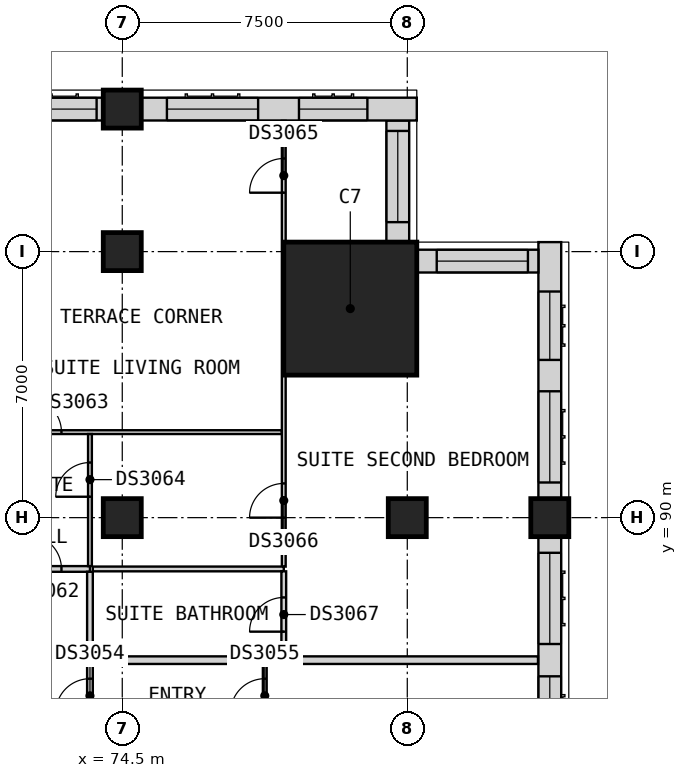
"""IFC4 building model, lengths in metres.
Left out: names, types, materials, properties, quantities, classifications, styles, units other than length and angle.
Written with IfcOpenShell. Run it as: python <this file> out.ifc"""

import sys

from ifc_helpers import new_model, si_unit, direction, frame, frame_2d, origin, origin_2d, place, context, subcontext, project, spatial, rectangle, extrude, element, fill, save


model = new_model("IFC4")
c1 = context("Model", 3, precision=1e-05, world=origin(), true_north=direction((0.0, 1.0)))
c2 = subcontext(c1, "Body", "Model", "MODEL_VIEW")
j1 = project(units=[si_unit("LENGTHUNIT", "METRE"), si_unit("PLANEANGLEUNIT", "RADIAN")], contexts=[c1])
p1 = place(None, origin())
s1 = spatial("IfcSite", under=j1, at=p1, CompositionType="ELEMENT")
p2 = place(p1, origin())
s2 = spatial("IfcBuilding", under=s1, at=p2, CompositionType="ELEMENT")
p3 = place(p2, frame((0.0, 0.0, 137.4)))
s3 = spatial("IfcBuildingStorey", under=s2, at=p3, CompositionType="ELEMENT", Elevation=137.4)
for number, where, z_axis, x_axis in (
    (1, (85.75, 90.0, 0.0), (0.0, 0.0, 1.0), (1.0, 0.0, 0.0)),
    (2, (74.5, 100.75, 0.0), (0.0, 0.0, 1.0), (1.0, 0.0, 0.0)),
    (3, (74.5, 90.0, 0.0), (0.0, 0.0, 1.0), (1.0, 0.0, 0.0)),
    (4, (74.5, 97.0, 0.0), (0.0, 0.0, 1.0), (1.0, 0.0, 0.0)),
    (5, (82.0, 90.0, 0.0), (0.0, 0.0, 1.0), (1.0, 0.0, 0.0)),
):
    element("IfcColumn", number, at=place(p3, frame(where, z_axis=z_axis, x_axis=x_axis)), inside=s3, PredefinedType="COLUMN", context=c2, shape_type="SweptSolid", body=[
        extrude(rectangle(XDim=1.0, YDim=1.0, at=origin_2d()), origin(), (0.0, 0.0, 1.0), 3.6),
    ])
p4 = place(p3, frame((80.5, 95.5, 0.0), z_axis=(0.0, 0.0, 1.0), x_axis=(1.0, 0.0, 0.0)))
e6 = element("IfcColumn", 6, at=p4, inside=s3, PredefinedType="COLUMN", context=c2, shape_type="SweptSolid", body=[
    extrude(rectangle(XDim=3.5, YDim=3.5, at=origin_2d()), origin(), (0.0, 0.0, 1.0), 3.6),
])
p5 = place(p3, frame((85.75, 83.0, 0.0), z_axis=(0.0, 0.0, 1.0), x_axis=(0.0, 1.0, 0.0)))
e7 = element("IfcWall", 7, at=p5, inside=s3, PredefinedType="SOLIDWALL", context=c2, shape_type="SweptSolid", body=[
    extrude(rectangle(XDim=6.5, YDim=0.6, at=frame_2d((3.25, 0.0))), origin(), (0.0, 0.0, 1.0), 2.85),
])
p6 = place(p5, frame((0.425, 0.0, 0.8)))
e8 = element("IfcOpeningElement", 8, at=p6, cuts=e7, PredefinedType="OPENING", context=c2, shape_type="SweptSolid", body=[
    extrude(rectangle(XDim=2.4, YDim=1.8, at=frame_2d((1.2, 0.9))), frame((0.0, 0.31, 0.0), z_axis=(0.0, -1.0, 0.0), x_axis=(1.0, 0.0, 0.0)), (0.0, 0.0, 1.0), 0.62),
])
p7 = place(p5, frame((3.675, 0.0, 0.8)))
e9 = element("IfcOpeningElement", 9, at=p7, cuts=e7, PredefinedType="OPENING", context=c2, shape_type="SweptSolid", body=[
    extrude(rectangle(XDim=2.4, YDim=1.8, at=frame_2d((1.2, 0.9))), frame((0.0, 0.31, 0.0), z_axis=(0.0, -1.0, 0.0), x_axis=(1.0, 0.0, 0.0)), (0.0, 0.0, 1.0), 0.62),
])
p8 = place(p3, frame((85.75, 90.5, 0.0), z_axis=(0.0, 0.0, 1.0), x_axis=(0.0, 1.0, 0.0)))
e10 = element("IfcWall", 10, at=p8, inside=s3, PredefinedType="SOLIDWALL", context=c2, shape_type="SweptSolid", body=[
    extrude(rectangle(XDim=6.75, YDim=0.6, at=frame_2d((3.375, 0.0))), origin(), (0.0, 0.0, 1.0), 2.85),
])
p9 = place(p8, frame((0.425, 0.0, 0.8)))
e11 = element("IfcOpeningElement", 11, at=p9, cuts=e10, PredefinedType="OPENING", context=c2, shape_type="SweptSolid", body=[
    extrude(rectangle(XDim=2.4, YDim=1.8, at=frame_2d((1.2, 0.9))), frame((0.0, 0.31, 0.0), z_axis=(0.0, -1.0, 0.0), x_axis=(1.0, 0.0, 0.0)), (0.0, 0.0, 1.0), 0.62),
])
p10 = place(p8, frame((3.65, 0.0, 0.8)))
e12 = element("IfcOpeningElement", 12, at=p10, cuts=e10, PredefinedType="OPENING", context=c2, shape_type="SweptSolid", body=[
    extrude(rectangle(XDim=1.8, YDim=1.8, at=frame_2d((0.9, 0.9))), frame((0.0, 0.31, 0.0), z_axis=(0.0, -1.0, 0.0), x_axis=(1.0, 0.0, 0.0)), (0.0, 0.0, 1.0), 0.62),
])
p11 = place(p3, frame((85.45, 96.75, 0.0), z_axis=(0.0, 0.0, 1.0), x_axis=(-1.0, 0.0, 0.0)))
e13 = element("IfcWall", 13, at=p11, inside=s3, PredefinedType="SOLIDWALL", context=c2, shape_type="SweptSolid", body=[
    extrude(rectangle(XDim=3.2, YDim=0.6, at=frame_2d((1.6, 0.0))), origin(), (0.0, 0.0, 1.0), 3.35),
])
p12 = place(p11, frame((0.275, 0.0, 0.8)))
e14 = element("IfcOpeningElement", 14, at=p12, cuts=e13, PredefinedType="OPENING", context=c2, shape_type="SweptSolid", body=[
    extrude(rectangle(XDim=2.4, YDim=1.8, at=frame_2d((1.2, 0.9))), frame((0.0, 0.31, 0.0), z_axis=(0.0, -1.0, 0.0), x_axis=(1.0, 0.0, 0.0)), (0.0, 0.0, 1.0), 0.62),
])
p13 = place(p3, frame((81.75, 97.25, 0.0), z_axis=(0.0, 0.0, 1.0), x_axis=(0.0, 1.0, 0.0)))
e15 = element("IfcWall", 15, at=p13, inside=s3, PredefinedType="SOLIDWALL", context=c2, shape_type="SweptSolid", body=[
    extrude(rectangle(XDim=3.2, YDim=0.6, at=frame_2d((1.6, 0.0))), origin(), (0.0, 0.0, 1.0), 3.35),
])
p14 = place(p13, frame((0.525, 0.0, 0.8)))
e16 = element("IfcOpeningElement", 16, at=p14, cuts=e15, PredefinedType="OPENING", context=c2, shape_type="SweptSolid", body=[
    extrude(rectangle(XDim=2.4, YDim=1.8, at=frame_2d((1.2, 0.9))), frame((0.0, 0.31, 0.0), z_axis=(0.0, -1.0, 0.0), x_axis=(1.0, 0.0, 0.0)), (0.0, 0.0, 1.0), 0.62),
])
p15 = place(p3, frame((82.25, 100.75, 0.0), z_axis=(0.0, 0.0, 1.0), x_axis=(-1.0, 0.0, 0.0)))
e17 = element("IfcWall", 17, at=p15, inside=s3, PredefinedType="SOLIDWALL", context=c2, shape_type="SweptSolid", body=[
    extrude(rectangle(XDim=7.25, YDim=0.6, at=frame_2d((3.625, 0.0))), origin(), (0.0, 0.0, 1.0), 2.85),
])
p16 = place(p15, frame((4.175, 0.0, 0.8)))
e18 = element("IfcOpeningElement", 18, at=p16, cuts=e17, PredefinedType="OPENING", context=c2, shape_type="SweptSolid", body=[
    extrude(rectangle(XDim=2.4, YDim=1.8, at=frame_2d((1.2, 0.9))), frame((0.0, 0.31, 0.0), z_axis=(0.0, -1.0, 0.0), x_axis=(1.0, 0.0, 0.0)), (0.0, 0.0, 1.0), 0.62),
])
p17 = place(p15, frame((1.3, 0.0, 0.8)))
e19 = element("IfcOpeningElement", 19, at=p17, cuts=e17, PredefinedType="OPENING", context=c2, shape_type="SweptSolid", body=[
    extrude(rectangle(XDim=1.8, YDim=1.8, at=frame_2d((0.9, 0.9))), frame((0.0, 0.31, 0.0), z_axis=(0.0, -1.0, 0.0), x_axis=(1.0, 0.0, 0.0)), (0.0, 0.0, 1.0), 0.62),
])
p18 = place(p3, frame((74.0, 100.75, 0.0), z_axis=(0.0, 0.0, 1.0), x_axis=(-1.0, 0.0, 0.0)))
e20 = element("IfcWall", 20, at=p18, inside=s3, PredefinedType="SOLIDWALL", context=c2, shape_type="SweptSolid", body=[
    extrude(rectangle(XDim=6.0, YDim=0.6, at=frame_2d((3.0, 0.0))), origin(), (0.0, 0.0, 1.0), 2.85),
])
p19 = place(p18, frame((3.175, 0.0, 0.8)))
e21 = element("IfcOpeningElement", 21, at=p19, cuts=e20, PredefinedType="OPENING", context=c2, shape_type="SweptSolid", body=[
    extrude(rectangle(XDim=2.4, YDim=1.8, at=frame_2d((1.2, 0.9))), frame((0.0, 0.31, 0.0), z_axis=(0.0, -1.0, 0.0), x_axis=(1.0, 0.0, 0.0)), (0.0, 0.0, 1.0), 0.62),
])
p20 = place(p18, frame((0.175, 0.0, 0.8)))
e22 = element("IfcOpeningElement", 22, at=p20, cuts=e20, PredefinedType="OPENING", context=c2, shape_type="SweptSolid", body=[
    extrude(rectangle(XDim=2.4, YDim=1.8, at=frame_2d((1.2, 0.9))), frame((0.0, 0.31, 0.0), z_axis=(0.0, -1.0, 0.0), x_axis=(1.0, 0.0, 0.0)), (0.0, 0.0, 1.0), 0.62),
])
p21 = place(p3, frame((73.725, 86.25, 0.0), z_axis=(0.0, 0.0, 1.0), x_axis=(1.0, 0.0, 0.0)))
e23 = element("IfcWall", 23, at=p21, inside=s3, PredefinedType="PARTITIONING", context=c2, shape_type="SweptSolid", body=[
    extrude(rectangle(XDim=11.715, YDim=0.2, at=frame_2d((5.857, 0.0))), origin(), (0.0, 0.0, 1.0), 3.35),
])
p22 = place(p3, frame((33.75, 88.65, 0.0), z_axis=(0.0, 0.0, 1.0), x_axis=(1.0, 0.0, 0.0)))
e24 = element("IfcWall", 24, at=p22, inside=s3, PredefinedType="PARTITIONING", context=c2, shape_type="SweptSolid", body=[
    extrude(rectangle(XDim=39.9, YDim=0.15, at=frame_2d((19.95, 0.0))), origin(), (0.0, 0.0, 1.0), 3.35),
])
p23 = place(p22, frame((5.175, 0.0, 0.0)))
e25 = element("IfcOpeningElement", 25, at=p23, cuts=e24, PredefinedType="OPENING", context=c2, shape_type="SweptSolid", body=[
    extrude(rectangle(XDim=0.9, YDim=2.1, at=frame_2d((0.45, 1.05))), frame((0.0, 0.085, 0.0), z_axis=(0.0, -1.0, 0.0), x_axis=(1.0, 0.0, 0.0)), (0.0, 0.0, 1.0), 0.17),
])
p24 = place(p22, frame((13.05, 0.0, 0.0)))
e26 = element("IfcOpeningElement", 26, at=p24, cuts=e24, PredefinedType="OPENING", context=c2, shape_type="SweptSolid", body=[
    extrude(rectangle(XDim=0.9, YDim=2.1, at=frame_2d((0.45, 1.05))), frame((0.0, 0.085, 0.0), z_axis=(0.0, -1.0, 0.0), x_axis=(1.0, 0.0, 0.0)), (0.0, 0.0, 1.0), 0.17),
])
p25 = place(p22, frame((28.05, 0.0, 0.0)))
e27 = element("IfcOpeningElement", 27, at=p25, cuts=e24, PredefinedType="OPENING", context=c2, shape_type="SweptSolid", body=[
    extrude(rectangle(XDim=0.9, YDim=2.1, at=frame_2d((0.45, 1.05))), frame((0.0, 0.085, 0.0), z_axis=(0.0, -1.0, 0.0), x_axis=(1.0, 0.0, 0.0)), (0.0, 0.0, 1.0), 0.17),
])
p26 = place(p22, frame((32.262, 0.0, 0.0)))
e28 = element("IfcOpeningElement", 28, at=p26, cuts=e24, PredefinedType="OPENING", context=c2, shape_type="SweptSolid", body=[
    extrude(rectangle(XDim=0.9, YDim=2.1, at=frame_2d((0.45, 1.05))), frame((0.0, 0.085, 0.0), z_axis=(0.0, -1.0, 0.0), x_axis=(1.0, 0.0, 0.0)), (0.0, 0.0, 1.0), 0.17),
])
p27 = place(p22, frame((36.113, 0.0, 0.0)))
e29 = element("IfcOpeningElement", 29, at=p27, cuts=e24, PredefinedType="OPENING", context=c2, shape_type="SweptSolid", body=[
    extrude(rectangle(XDim=0.9, YDim=2.1, at=frame_2d((0.45, 1.05))), frame((0.0, 0.085, 0.0), z_axis=(0.0, -1.0, 0.0), x_axis=(1.0, 0.0, 0.0)), (0.0, 0.0, 1.0), 0.17),
])
p28 = place(p22, frame((38.25, 0.0, 0.0)))
e30 = element("IfcOpeningElement", 30, at=p28, cuts=e24, PredefinedType="OPENING", context=c2, shape_type="SweptSolid", body=[
    extrude(rectangle(XDim=0.9, YDim=2.1, at=frame_2d((0.45, 1.05))), frame((0.0, 0.085, 0.0), z_axis=(0.0, -1.0, 0.0), x_axis=(1.0, 0.0, 0.0)), (0.0, 0.0, 1.0), 0.17),
])
p29 = place(p3, frame((73.65, 50.175, 0.0), z_axis=(0.0, 0.0, 1.0), x_axis=(0.0, 1.0, 0.0)))
e31 = element("IfcWall", 31, at=p29, inside=s3, PredefinedType="PARTITIONING", context=c2, shape_type="SweptSolid", body=[
    extrude(rectangle(XDim=38.4, YDim=0.15, at=frame_2d((19.2, 0.0))), origin(), (0.0, 0.0, 1.0), 3.35),
])
p30 = place(p29, frame((4.688, 0.0, 0.0)))
e32 = element("IfcOpeningElement", 32, at=p30, cuts=e31, PredefinedType="OPENING", context=c2, shape_type="SweptSolid", body=[
    extrude(rectangle(XDim=0.9, YDim=2.1, at=frame_2d((0.45, 1.05))), frame((0.0, 0.085, 0.0), z_axis=(0.0, -1.0, 0.0), x_axis=(1.0, 0.0, 0.0)), (0.0, 0.0, 1.0), 0.17),
])
p31 = place(p29, frame((11.625, 0.0, 0.0)))
e33 = element("IfcOpeningElement", 33, at=p31, cuts=e31, PredefinedType="OPENING", context=c2, shape_type="SweptSolid", body=[
    extrude(rectangle(XDim=0.9, YDim=2.1, at=frame_2d((0.45, 1.05))), frame((0.0, 0.085, 0.0), z_axis=(0.0, -1.0, 0.0), x_axis=(1.0, 0.0, 0.0)), (0.0, 0.0, 1.0), 0.17),
])
p32 = place(p29, frame((22.875, 0.0, 0.0)))
e34 = element("IfcOpeningElement", 34, at=p32, cuts=e31, PredefinedType="OPENING", context=c2, shape_type="SweptSolid", body=[
    extrude(rectangle(XDim=0.9, YDim=2.1, at=frame_2d((0.45, 1.05))), frame((0.0, 0.085, 0.0), z_axis=(0.0, -1.0, 0.0), x_axis=(1.0, 0.0, 0.0)), (0.0, 0.0, 1.0), 0.17),
])
p33 = place(p29, frame((34.688, 0.0, 0.0)))
e35 = element("IfcOpeningElement", 35, at=p33, cuts=e31, PredefinedType="OPENING", context=c2, shape_type="SweptSolid", body=[
    extrude(rectangle(XDim=0.9, YDim=2.1, at=frame_2d((0.45, 1.05))), frame((0.0, 0.085, 0.0), z_axis=(0.0, -1.0, 0.0), x_axis=(1.0, 0.0, 0.0)), (0.0, 0.0, 1.0), 0.17),
])
p34 = place(p3, frame((71.35, 92.25, 0.0), z_axis=(0.0, 0.0, 1.0), x_axis=(1.0, 0.0, 0.0)))
e36 = element("IfcWall", 36, at=p34, inside=s3, PredefinedType="PARTITIONING", context=c2, shape_type="SweptSolid", body=[
    extrude(rectangle(XDim=7.35, YDim=0.1, at=frame_2d((3.675, 0.0))), origin(), (0.0, 0.0, 1.0), 3.35),
])
p35 = place(p34, frame((0.65, 0.0, 0.0)))
e37 = element("IfcOpeningElement", 37, at=p35, cuts=e36, PredefinedType="OPENING", context=c2, shape_type="SweptSolid", body=[
    extrude(rectangle(XDim=0.9, YDim=2.1, at=frame_2d((0.45, 1.05))), frame((0.0, 0.06, 0.0), z_axis=(0.0, -1.0, 0.0), x_axis=(1.0, 0.0, 0.0)), (0.0, 0.0, 1.0), 0.12),
])
p36 = place(p3, frame((78.8, 96.75, 0.0), z_axis=(0.0, 0.0, 1.0), x_axis=(1.0, 0.0, 0.0)))
e38 = element("IfcWall", 38, at=p36, inside=s3, PredefinedType="PARTITIONING", context=c2, shape_type="SweptSolid", body=[
    extrude(rectangle(XDim=3.44, YDim=0.1, at=frame_2d((1.72, 0.0))), origin(), (0.0, 0.0, 1.0), 3.35),
])
p37 = place(p3, frame((73.65, 88.725, 0.0), z_axis=(0.0, 0.0, 1.0), x_axis=(0.0, 1.0, 0.0)))
e39 = element("IfcWall", 39, at=p37, inside=s3, PredefinedType="PARTITIONING", context=c2, shape_type="SweptSolid", body=[
    extrude(rectangle(XDim=3.475, YDim=0.1, at=frame_2d((1.737, 0.0))), origin(), (0.0, 0.0, 1.0), 3.35),
])
p38 = place(p37, frame((1.825, 0.0, 0.0)))
e40 = element("IfcOpeningElement", 40, at=p38, cuts=e39, PredefinedType="OPENING", context=c2, shape_type="SweptSolid", body=[
    extrude(rectangle(XDim=0.9, YDim=2.1, at=frame_2d((0.45, 1.05))), frame((0.0, 0.06, 0.0), z_axis=(0.0, -1.0, 0.0), x_axis=(1.0, 0.0, 0.0)), (0.0, 0.0, 1.0), 0.12),
])
p39 = place(p3, frame((78.25, 84.438, 0.0), z_axis=(0.0, 0.0, 1.0), x_axis=(0.0, 1.0, 0.0)))
e41 = element("IfcWall", 41, at=p39, inside=s3, PredefinedType="PARTITIONING", context=c2, shape_type="SweptSolid", body=[
    extrude(rectangle(XDim=1.712, YDim=0.1, at=frame_2d((0.856, 0.0))), origin(), (0.0, 0.0, 1.0), 3.35),
])
p40 = place(p39, frame((0.425, 0.0, 0.0)))
e42 = element("IfcOpeningElement", 42, at=p40, cuts=e41, PredefinedType="OPENING", context=c2, shape_type="SweptSolid", body=[
    extrude(rectangle(XDim=0.9, YDim=2.1, at=frame_2d((0.45, 1.05))), frame((0.0, 0.06, 0.0), z_axis=(0.0, -1.0, 0.0), x_axis=(1.0, 0.0, 0.0)), (0.0, 0.0, 1.0), 0.12),
])
p41 = place(p3, frame((78.75, 88.712, 0.0), z_axis=(0.0, 0.0, 1.0), x_axis=(0.0, 1.0, 0.0)))
e43 = element("IfcWall", 43, at=p41, inside=s3, PredefinedType="PARTITIONING", context=c2, shape_type="SweptSolid", body=[
    extrude(rectangle(XDim=11.728, YDim=0.1, at=frame_2d((5.864, 0.0))), origin(), (0.0, 0.0, 1.0), 3.35),
])
p42 = place(p41, frame((9.837, 0.0, 0.0)))
e44 = element("IfcOpeningElement", 44, at=p42, cuts=e43, PredefinedType="OPENING", context=c2, shape_type="SweptSolid", body=[
    extrude(rectangle(XDim=0.9, YDim=2.1, at=frame_2d((0.45, 1.05))), frame((0.0, 0.06, 0.0), z_axis=(0.0, -1.0, 0.0), x_axis=(1.0, 0.0, 0.0)), (0.0, 0.0, 1.0), 0.12),
])
p43 = place(p41, frame((1.288, 0.0, 0.0)))
e45 = element("IfcOpeningElement", 45, at=p43, cuts=e43, PredefinedType="OPENING", context=c2, shape_type="SweptSolid", body=[
    extrude(rectangle(XDim=0.9, YDim=2.1, at=frame_2d((0.45, 1.05))), frame((0.0, 0.06, 0.0), z_axis=(0.0, -1.0, 0.0), x_axis=(1.0, 0.0, 0.0)), (0.0, 0.0, 1.0), 0.12),
])
p44 = place(p3, frame((73.725, 88.65, 0.0), z_axis=(0.0, 0.0, 1.0), x_axis=(1.0, 0.0, 0.0)))
e46 = element("IfcWall", 46, at=p44, inside=s3, PredefinedType="PARTITIONING", context=c2, shape_type="SweptSolid", body=[
    extrude(rectangle(XDim=5.025, YDim=0.125, at=frame_2d((2.512, 0.0))), origin(), (0.0, 0.0, 1.0), 3.35),
])
p45 = place(p3, frame((78.75, 86.35, 0.0), z_axis=(0.0, 0.0, 1.0), x_axis=(0.0, 1.0, 0.0)))
e47 = element("IfcWall", 47, at=p45, inside=s3, PredefinedType="PARTITIONING", context=c2, shape_type="SweptSolid", body=[
    extrude(rectangle(XDim=2.237, YDim=0.125, at=frame_2d((1.119, 0.0))), origin(), (0.0, 0.0, 1.0), 3.35),
])
p46 = place(p45, frame((0.65, 0.0, 0.0)))
e48 = element("IfcOpeningElement", 48, at=p46, cuts=e47, PredefinedType="OPENING", context=c2, shape_type="SweptSolid", body=[
    extrude(rectangle(XDim=0.9, YDim=2.1, at=frame_2d((0.45, 1.05))), frame((0.0, 0.073, 0.0), z_axis=(0.0, -1.0, 0.0), x_axis=(1.0, 0.0, 0.0)), (0.0, 0.0, 1.0), 0.145),
])
p47 = place(p6, origin())
e49 = element("IfcWindow", 49, at=p47, inside=s3, PartitioningType="SINGLE_PANEL", PredefinedType="WINDOW", context=c2, shape_type="SweptSolid", body=[
    extrude(rectangle(XDim=2.4, YDim=1.8, at=frame_2d((1.2, 0.9))), frame((0.0, -0.07, 0.0), z_axis=(0.0, -1.0, 0.0), x_axis=(1.0, 0.0, 0.0)), (0.0, 0.0, 1.0), 0.06),
])
fill(e8, e49)
p48 = place(p7, origin())
e50 = element("IfcWindow", 50, at=p48, inside=s3, PartitioningType="SINGLE_PANEL", PredefinedType="WINDOW", context=c2, shape_type="SweptSolid", body=[
    extrude(rectangle(XDim=2.4, YDim=1.8, at=frame_2d((1.2, 0.9))), frame((0.0, -0.07, 0.0), z_axis=(0.0, -1.0, 0.0), x_axis=(1.0, 0.0, 0.0)), (0.0, 0.0, 1.0), 0.06),
])
fill(e9, e50)
p49 = place(p9, origin())
e51 = element("IfcWindow", 51, at=p49, inside=s3, PartitioningType="SINGLE_PANEL", PredefinedType="WINDOW", context=c2, shape_type="SweptSolid", body=[
    extrude(rectangle(XDim=2.4, YDim=1.8, at=frame_2d((1.2, 0.9))), frame((0.0, -0.07, 0.0), z_axis=(0.0, -1.0, 0.0), x_axis=(1.0, 0.0, 0.0)), (0.0, 0.0, 1.0), 0.06),
])
fill(e11, e51)
p50 = place(p10, origin())
e52 = element("IfcWindow", 52, at=p50, inside=s3, PartitioningType="SINGLE_PANEL", PredefinedType="WINDOW", context=c2, shape_type="SweptSolid", body=[
    extrude(rectangle(XDim=1.8, YDim=1.8, at=frame_2d((0.9, 0.9))), frame((0.0, -0.07, 0.0), z_axis=(0.0, -1.0, 0.0), x_axis=(1.0, 0.0, 0.0)), (0.0, 0.0, 1.0), 0.06),
])
fill(e12, e52)
p51 = place(p12, origin())
e53 = element("IfcWindow", 53, at=p51, inside=s3, PartitioningType="SINGLE_PANEL", PredefinedType="WINDOW", context=c2, shape_type="SweptSolid", body=[
    extrude(rectangle(XDim=2.4, YDim=1.8, at=frame_2d((1.2, 0.9))), frame((0.0, -0.07, 0.0), z_axis=(0.0, -1.0, 0.0), x_axis=(1.0, 0.0, 0.0)), (0.0, 0.0, 1.0), 0.06),
])
fill(e14, e53)
p52 = place(p14, origin())
e54 = element("IfcWindow", 54, at=p52, inside=s3, PartitioningType="SINGLE_PANEL", PredefinedType="WINDOW", context=c2, shape_type="SweptSolid", body=[
    extrude(rectangle(XDim=2.4, YDim=1.8, at=frame_2d((1.2, 0.9))), frame((0.0, -0.07, 0.0), z_axis=(0.0, -1.0, 0.0), x_axis=(1.0, 0.0, 0.0)), (0.0, 0.0, 1.0), 0.06),
])
fill(e16, e54)
p53 = place(p16, origin())
e55 = element("IfcWindow", 55, at=p53, inside=s3, PartitioningType="SINGLE_PANEL", PredefinedType="WINDOW", context=c2, shape_type="SweptSolid", body=[
    extrude(rectangle(XDim=2.4, YDim=1.8, at=frame_2d((1.2, 0.9))), frame((0.0, -0.07, 0.0), z_axis=(0.0, -1.0, 0.0), x_axis=(1.0, 0.0, 0.0)), (0.0, 0.0, 1.0), 0.06),
])
fill(e18, e55)
p54 = place(p17, origin())
e56 = element("IfcWindow", 56, at=p54, inside=s3, PartitioningType="SINGLE_PANEL", PredefinedType="WINDOW", context=c2, shape_type="SweptSolid", body=[
    extrude(rectangle(XDim=1.8, YDim=1.8, at=frame_2d((0.9, 0.9))), frame((0.0, -0.07, 0.0), z_axis=(0.0, -1.0, 0.0), x_axis=(1.0, 0.0, 0.0)), (0.0, 0.0, 1.0), 0.06),
])
fill(e19, e56)
p55 = place(p20, origin())
e57 = element("IfcWindow", 57, at=p55, inside=s3, PartitioningType="SINGLE_PANEL", PredefinedType="WINDOW", context=c2, shape_type="SweptSolid", body=[
    extrude(rectangle(XDim=2.4, YDim=1.8, at=frame_2d((1.2, 0.9))), frame((0.0, -0.07, 0.0), z_axis=(0.0, -1.0, 0.0), x_axis=(1.0, 0.0, 0.0)), (0.0, 0.0, 1.0), 0.06),
])
fill(e22, e57)
p56 = place(p33, origin())
e58 = element("IfcDoor", 58, at=p56, inside=s3, OperationType="SINGLE_SWING_RIGHT", PredefinedType="DOOR", context=c2, shape_type="SweptSolid", body=[
    extrude(rectangle(XDim=0.9, YDim=2.1, at=frame_2d((0.45, 1.05))), frame((0.0, 0.025, 0.0), z_axis=(0.0, -1.0, 0.0), x_axis=(1.0, 0.0, 0.0)), (0.0, 0.0, 1.0), 0.05),
])
fill(e35, e58)
p57 = place(p40, origin())
e59 = element("IfcDoor", 59, at=p57, inside=s3, OperationType="SINGLE_SWING_LEFT", PredefinedType="DOOR", context=c2, shape_type="SweptSolid", body=[
    extrude(rectangle(XDim=0.9, YDim=2.1, at=frame_2d((0.45, 1.05))), frame((0.0, 0.025, 0.0), z_axis=(0.0, -1.0, 0.0), x_axis=(1.0, 0.0, 0.0)), (0.0, 0.0, 1.0), 0.05),
])
fill(e42, e59)
p58 = place(p28, origin())
e60 = element("IfcDoor", 60, at=p58, inside=s3, OperationType="SINGLE_SWING_RIGHT", PredefinedType="DOOR", context=c2, shape_type="SweptSolid", body=[
    extrude(rectangle(XDim=0.9, YDim=2.1, at=frame_2d((0.45, 1.05))), frame((0.0, 0.025, 0.0), z_axis=(0.0, -1.0, 0.0), x_axis=(1.0, 0.0, 0.0)), (0.0, 0.0, 1.0), 0.05),
])
fill(e30, e60)
p59 = place(p35, origin())
e61 = element("IfcDoor", 61, at=p59, inside=s3, OperationType="SINGLE_SWING_LEFT", PredefinedType="DOOR", context=c2, shape_type="SweptSolid", body=[
    extrude(rectangle(XDim=0.9, YDim=2.1, at=frame_2d((0.45, 1.05))), frame((0.0, 0.025, 0.0), z_axis=(0.0, -1.0, 0.0), x_axis=(1.0, 0.0, 0.0)), (0.0, 0.0, 1.0), 0.05),
])
fill(e37, e61)
p60 = place(p38, origin())
e62 = element("IfcDoor", 62, at=p60, inside=s3, OperationType="SINGLE_SWING_RIGHT", PredefinedType="DOOR", context=c2, shape_type="SweptSolid", body=[
    extrude(rectangle(XDim=0.9, YDim=2.1, at=frame_2d((0.45, 1.05))), frame((0.0, 0.025, 0.0), z_axis=(0.0, -1.0, 0.0), x_axis=(1.0, 0.0, 0.0)), (0.0, 0.0, 1.0), 0.05),
])
fill(e40, e62)
p61 = place(p42, origin())
e63 = element("IfcDoor", 63, at=p61, inside=s3, OperationType="SINGLE_SWING_LEFT", PredefinedType="DOOR", context=c2, shape_type="SweptSolid", body=[
    extrude(rectangle(XDim=0.9, YDim=2.1, at=frame_2d((0.45, 1.05))), frame((0.0, 0.025, 0.0), z_axis=(0.0, -1.0, 0.0), x_axis=(1.0, 0.0, 0.0)), (0.0, 0.0, 1.0), 0.05),
])
fill(e44, e63)
p62 = place(p43, origin())
e64 = element("IfcDoor", 64, at=p62, inside=s3, OperationType="SINGLE_SWING_RIGHT", PredefinedType="DOOR", context=c2, shape_type="SweptSolid", body=[
    extrude(rectangle(XDim=0.9, YDim=2.1, at=frame_2d((0.45, 1.05))), frame((0.0, 0.025, 0.0), z_axis=(0.0, -1.0, 0.0), x_axis=(1.0, 0.0, 0.0)), (0.0, 0.0, 1.0), 0.05),
])
fill(e45, e64)
p63 = place(p46, origin())
e65 = element("IfcDoor", 65, at=p63, inside=s3, OperationType="SINGLE_SWING_LEFT", PredefinedType="DOOR", context=c2, shape_type="SweptSolid", body=[
    extrude(rectangle(XDim=0.9, YDim=2.1, at=frame_2d((0.45, 1.05))), frame((0.0, 0.025, 0.0), z_axis=(0.0, -1.0, 0.0), x_axis=(1.0, 0.0, 0.0)), (0.0, 0.0, 1.0), 0.05),
])
fill(e48, e65)
save(model, sys.argv[1])
